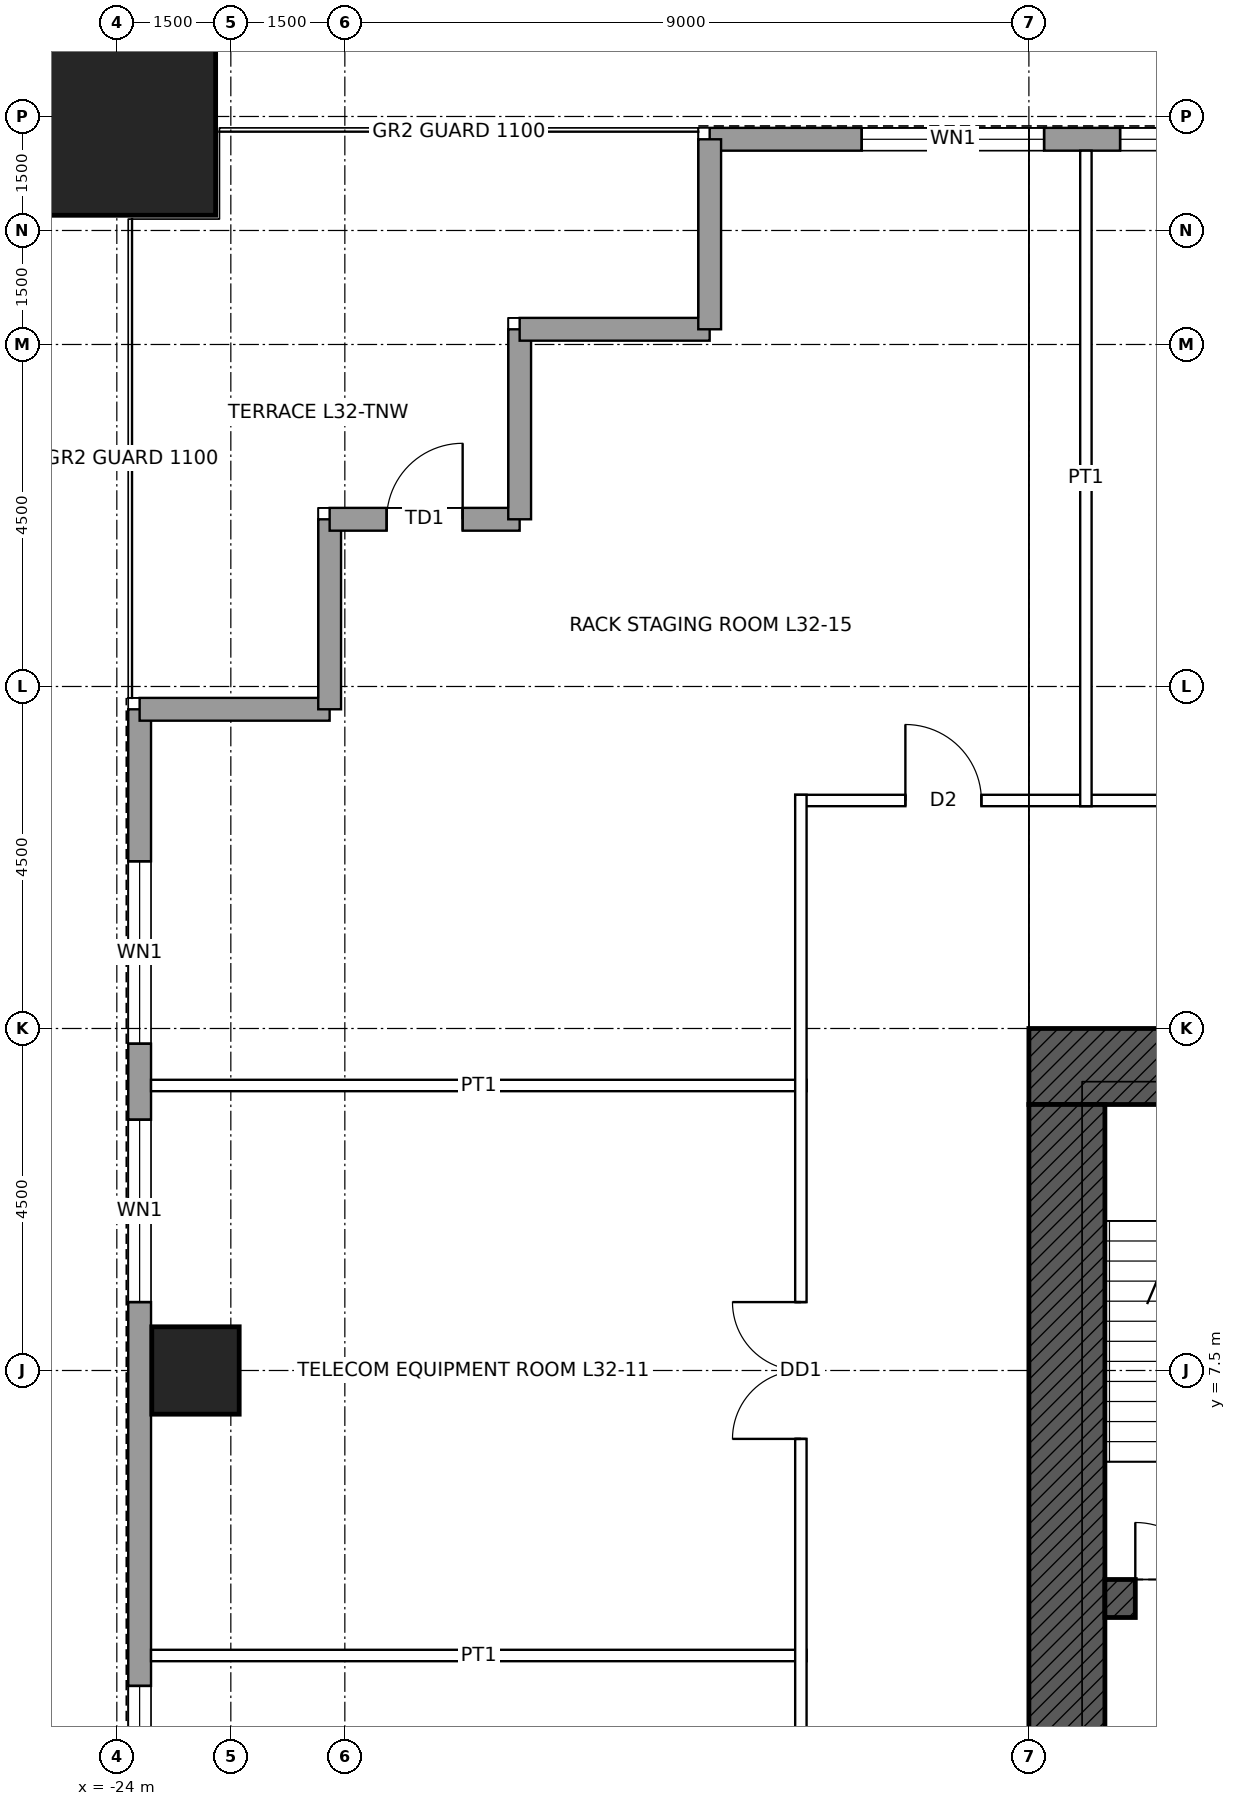
"""IFC4 building model, lengths in metres.
Left out: names, types, materials, properties, quantities, classifications, styles, units other than length and angle.
Written with IfcOpenShell. Run it as: python <this file> out.ifc"""

import sys

from ifc_helpers import new_model, si_unit, direction, frame, frame_2d, origin, origin_2d, place, context, subcontext, project, spatial, rectangle, hollow_rectangle, extrude, element, fill, save


model = new_model("IFC4")
c1 = context("Model", 3, precision=1e-05, world=origin(), true_north=direction((0.0, 1.0)))
c2 = subcontext(c1, "Body", "Model", "MODEL_VIEW")
j1 = project(units=[si_unit("LENGTHUNIT", "METRE"), si_unit("PLANEANGLEUNIT", "RADIAN")], contexts=[c1])
p1 = place(None, origin())
s1 = spatial("IfcSite", under=j1, at=p1, CompositionType="ELEMENT")
p2 = place(p1, origin())
s2 = spatial("IfcBuilding", under=s1, at=p2, CompositionType="ELEMENT")
p3 = place(p2, frame((0.0, 0.0, 158.4)))
s3 = spatial("IfcBuildingStorey", under=s2, at=p3, CompositionType="ELEMENT", Elevation=158.4)
p4 = place(p3, frame((-24.0, 24.0, 0.0), z_axis=(0.0, 0.0, 1.0), x_axis=(1.0, 0.0, 0.0)))
e1 = element("IfcColumn", 1, at=p4, inside=s3, PredefinedType="COLUMN", context=c2, shape_type="SweptSolid", body=[
    extrude(hollow_rectangle(XDim=2.6, YDim=2.6, WallThickness=0.13, at=origin_2d()), origin(), (0.0, 0.0, 1.0), 4.5),
])
p5 = place(p3, frame((-22.965, 7.5, 0.0), z_axis=(0.0, 0.0, 1.0), x_axis=(1.0, 0.0, 0.0)))
e2 = element("IfcColumn", 2, at=p5, inside=s3, PredefinedType="COLUMN", context=c2, shape_type="SweptSolid", body=[
    extrude(hollow_rectangle(XDim=1.15, YDim=1.15, WallThickness=0.075, at=origin_2d()), origin(), (0.0, 0.0, 1.0), 4.5),
])
p6 = place(p3, frame((-12.0, 11.5, 0.0), z_axis=(0.0, 0.0, 1.0), x_axis=(1.0, 0.0, 0.0)))
e3 = element("IfcWall", 3, at=p6, inside=s3, PredefinedType="SHEAR", context=c2, shape_type="SweptSolid", body=[
    extrude(rectangle(XDim=24.0, YDim=1.0, at=frame_2d((12.0, 0.0))), origin(), (0.0, 0.0, 1.0), 4.5),
])
p7 = place(p6, frame((6.25, 0.0, 0.0)))
e4 = element("IfcOpeningElement", 4, at=p7, cuts=e3, PredefinedType="OPENING", context=c2, shape_type="SweptSolid", body=[
    extrude(rectangle(XDim=1.0, YDim=2.4, at=frame_2d((0.5, 1.2))), frame((0.0, 0.51, 0.0), z_axis=(0.0, -1.0, 0.0), x_axis=(1.0, 0.0, 0.0)), (0.0, 0.0, 1.0), 1.02),
])
p8 = place(p6, frame((16.75, 0.0, 0.0)))
e5 = element("IfcOpeningElement", 5, at=p8, cuts=e3, PredefinedType="OPENING", context=c2, shape_type="SweptSolid", body=[
    extrude(rectangle(XDim=1.0, YDim=2.4, at=frame_2d((0.5, 1.2))), frame((0.0, 0.51, 0.0), z_axis=(0.0, -1.0, 0.0), x_axis=(1.0, 0.0, 0.0)), (0.0, 0.0, 1.0), 1.02),
])
p9 = place(p3, frame((-11.5, -11.0, 0.0), z_axis=(0.0, 0.0, 1.0), x_axis=(0.0, 1.0, 0.0)))
e6 = element("IfcWall", 6, at=p9, inside=s3, PredefinedType="SHEAR", context=c2, shape_type="SweptSolid", body=[
    extrude(rectangle(XDim=22.0, YDim=1.0, at=frame_2d((11.0, 0.0))), origin(), (0.0, 0.0, 1.0), 4.5),
])
p10 = place(p9, frame((10.5, 0.0, 0.0)))
e7 = element("IfcOpeningElement", 7, at=p10, cuts=e6, PredefinedType="OPENING", context=c2, shape_type="SweptSolid", body=[
    extrude(rectangle(XDim=1.0, YDim=2.4, at=frame_2d((0.5, 1.2))), frame((0.0, 0.51, 0.0), z_axis=(0.0, -1.0, 0.0), x_axis=(1.0, 0.0, 0.0)), (0.0, 0.0, 1.0), 1.02),
])
p11 = place(p3, frame((-11.0, 4.5, 0.0), z_axis=(0.0, 0.0, 1.0), x_axis=(1.0, 0.0, 0.0)))
e8 = element("IfcWall", 8, at=p11, inside=s3, PredefinedType="SHEAR", context=c2, shape_type="SweptSolid", body=[
    extrude(rectangle(XDim=22.0, YDim=0.5, at=frame_2d((11.0, 0.0))), origin(), (0.0, 0.0, 1.0), 4.5),
])
p12 = place(p11, frame((0.4, 0.0, 0.0)))
e9 = element("IfcOpeningElement", 9, at=p12, cuts=e8, PredefinedType="OPENING", context=c2, shape_type="SweptSolid", body=[
    extrude(rectangle(XDim=1.0, YDim=2.1, at=frame_2d((0.5, 1.05))), frame((0.0, 0.26, 0.0), z_axis=(0.0, -1.0, 0.0), x_axis=(1.0, 0.0, 0.0)), (0.0, 0.0, 1.0), 0.52),
])
p13 = place(p11, frame((20.6, 0.0, 0.0)))
e10 = element("IfcOpeningElement", 10, at=p13, cuts=e8, PredefinedType="OPENING", context=c2, shape_type="SweptSolid", body=[
    extrude(rectangle(XDim=1.0, YDim=2.1, at=frame_2d((0.5, 1.05))), frame((0.0, 0.26, 0.0), z_axis=(0.0, -1.0, 0.0), x_axis=(1.0, 0.0, 0.0)), (0.0, 0.0, 1.0), 0.52),
])
p14 = place(p3, frame((-16.2, 23.7, 0.0), z_axis=(0.0, 0.0, 1.0), x_axis=(1.0, 0.0, 0.0)))
e11 = element("IfcWall", 11, at=p14, inside=s3, PredefinedType="SOLIDWALL", context=c2, shape_type="SweptSolid", body=[
    extrude(rectangle(XDim=32.4, YDim=0.3, at=frame_2d((16.2, 0.0))), origin(), (0.0, 0.0, 1.0), 4.3),
])
p15 = place(p14, frame((2.0, 0.0, 1.0)))
e12 = element("IfcOpeningElement", 12, at=p15, cuts=e11, PredefinedType="OPENING", context=c2, shape_type="SweptSolid", body=[
    extrude(rectangle(XDim=2.4, YDim=1.2, at=frame_2d((1.2, 0.6))), frame((0.0, 0.16, 0.0), z_axis=(0.0, -1.0, 0.0), x_axis=(1.0, 0.0, 0.0)), (0.0, 0.0, 1.0), 0.32),
])
p16 = place(p14, frame((5.4, 0.0, 1.0)))
e13 = element("IfcOpeningElement", 13, at=p16, cuts=e11, PredefinedType="OPENING", context=c2, shape_type="SweptSolid", body=[
    extrude(rectangle(XDim=2.4, YDim=1.2, at=frame_2d((1.2, 0.6))), frame((0.0, 0.16, 0.0), z_axis=(0.0, -1.0, 0.0), x_axis=(1.0, 0.0, 0.0)), (0.0, 0.0, 1.0), 0.32),
])
p17 = place(p14, frame((10.45, 0.0, 1.0)))
e14 = element("IfcOpeningElement", 14, at=p17, cuts=e11, PredefinedType="OPENING", context=c2, shape_type="SweptSolid", body=[
    extrude(rectangle(XDim=2.4, YDim=1.2, at=frame_2d((1.2, 0.6))), frame((0.0, 0.16, 0.0), z_axis=(0.0, -1.0, 0.0), x_axis=(1.0, 0.0, 0.0)), (0.0, 0.0, 1.0), 0.32),
])
p18 = place(p14, frame((13.15, 0.0, 1.0)))
e15 = element("IfcOpeningElement", 15, at=p18, cuts=e11, PredefinedType="OPENING", context=c2, shape_type="SweptSolid", body=[
    extrude(rectangle(XDim=2.4, YDim=1.2, at=frame_2d((1.2, 0.6))), frame((0.0, 0.16, 0.0), z_axis=(0.0, -1.0, 0.0), x_axis=(1.0, 0.0, 0.0)), (0.0, 0.0, 1.0), 0.32),
])
p19 = place(p14, frame((16.85, 0.0, 1.0)))
e16 = element("IfcOpeningElement", 16, at=p19, cuts=e11, PredefinedType="OPENING", context=c2, shape_type="SweptSolid", body=[
    extrude(rectangle(XDim=2.4, YDim=1.2, at=frame_2d((1.2, 0.6))), frame((0.0, 0.16, 0.0), z_axis=(0.0, -1.0, 0.0), x_axis=(1.0, 0.0, 0.0)), (0.0, 0.0, 1.0), 0.32),
])
p20 = place(p14, frame((19.55, 0.0, 1.0)))
e17 = element("IfcOpeningElement", 17, at=p20, cuts=e11, PredefinedType="OPENING", context=c2, shape_type="SweptSolid", body=[
    extrude(rectangle(XDim=2.4, YDim=1.2, at=frame_2d((1.2, 0.6))), frame((0.0, 0.16, 0.0), z_axis=(0.0, -1.0, 0.0), x_axis=(1.0, 0.0, 0.0)), (0.0, 0.0, 1.0), 0.32),
])
p21 = place(p14, frame((24.6, 0.0, 1.0)))
e18 = element("IfcOpeningElement", 18, at=p21, cuts=e11, PredefinedType="OPENING", context=c2, shape_type="SweptSolid", body=[
    extrude(rectangle(XDim=2.4, YDim=1.2, at=frame_2d((1.2, 0.6))), frame((0.0, 0.16, 0.0), z_axis=(0.0, -1.0, 0.0), x_axis=(1.0, 0.0, 0.0)), (0.0, 0.0, 1.0), 0.32),
])
p22 = place(p14, frame((28.0, 0.0, 1.0)))
e19 = element("IfcOpeningElement", 19, at=p22, cuts=e11, PredefinedType="OPENING", context=c2, shape_type="SweptSolid", body=[
    extrude(rectangle(XDim=2.4, YDim=1.2, at=frame_2d((1.2, 0.6))), frame((0.0, 0.16, 0.0), z_axis=(0.0, -1.0, 0.0), x_axis=(1.0, 0.0, 0.0)), (0.0, 0.0, 1.0), 0.32),
])
p23 = place(p3, frame((-23.7, -16.2, 0.0), z_axis=(0.0, 0.0, 1.0), x_axis=(0.0, 1.0, 0.0)))
e20 = element("IfcWall", 20, at=p23, inside=s3, PredefinedType="SOLIDWALL", context=c2, shape_type="SweptSolid", body=[
    extrude(rectangle(XDim=32.4, YDim=0.3, at=frame_2d((16.2, 0.0))), origin(), (0.0, 0.0, 1.0), 4.3),
])
p24 = place(p23, frame((0.65, 0.0, 1.0)))
e21 = element("IfcOpeningElement", 21, at=p24, cuts=e20, PredefinedType="OPENING", context=c2, shape_type="SweptSolid", body=[
    extrude(rectangle(XDim=1.8, YDim=1.2, at=frame_2d((0.9, 0.6))), frame((0.0, 0.16, 0.0), z_axis=(0.0, -1.0, 0.0), x_axis=(1.0, 0.0, 0.0)), (0.0, 0.0, 1.0), 0.32),
])
p25 = place(p23, frame((2.75, 0.0, 1.0)))
e22 = element("IfcOpeningElement", 22, at=p25, cuts=e20, PredefinedType="OPENING", context=c2, shape_type="SweptSolid", body=[
    extrude(rectangle(XDim=1.8, YDim=1.2, at=frame_2d((0.9, 0.6))), frame((0.0, 0.16, 0.0), z_axis=(0.0, -1.0, 0.0), x_axis=(1.0, 0.0, 0.0)), (0.0, 0.0, 1.0), 0.32),
])
p26 = place(p23, frame((5.4, 0.0, 1.0)))
e23 = element("IfcOpeningElement", 23, at=p26, cuts=e20, PredefinedType="OPENING", context=c2, shape_type="SweptSolid", body=[
    extrude(rectangle(XDim=2.4, YDim=1.2, at=frame_2d((1.2, 0.6))), frame((0.0, 0.16, 0.0), z_axis=(0.0, -1.0, 0.0), x_axis=(1.0, 0.0, 0.0)), (0.0, 0.0, 1.0), 0.32),
])
p27 = place(p23, frame((12.95, 0.0, 1.0)))
e24 = element("IfcOpeningElement", 24, at=p27, cuts=e20, PredefinedType="OPENING", context=c2, shape_type="SweptSolid", body=[
    extrude(rectangle(XDim=2.4, YDim=1.2, at=frame_2d((1.2, 0.6))), frame((0.0, 0.16, 0.0), z_axis=(0.0, -1.0, 0.0), x_axis=(1.0, 0.0, 0.0)), (0.0, 0.0, 1.0), 0.32),
])
p28 = place(p23, frame((15.65, 0.0, 1.0)))
e25 = element("IfcOpeningElement", 25, at=p28, cuts=e20, PredefinedType="OPENING", context=c2, shape_type="SweptSolid", body=[
    extrude(rectangle(XDim=1.8, YDim=1.2, at=frame_2d((0.9, 0.6))), frame((0.0, 0.16, 0.0), z_axis=(0.0, -1.0, 0.0), x_axis=(1.0, 0.0, 0.0)), (0.0, 0.0, 1.0), 0.32),
])
p29 = place(p23, frame((17.75, 0.0, 1.0)))
e26 = element("IfcOpeningElement", 26, at=p29, cuts=e20, PredefinedType="OPENING", context=c2, shape_type="SweptSolid", body=[
    extrude(rectangle(XDim=1.8, YDim=1.2, at=frame_2d((0.9, 0.6))), frame((0.0, 0.16, 0.0), z_axis=(0.0, -1.0, 0.0), x_axis=(1.0, 0.0, 0.0)), (0.0, 0.0, 1.0), 0.32),
])
p30 = place(p23, frame((24.6, 0.0, 1.0)))
e27 = element("IfcOpeningElement", 27, at=p30, cuts=e20, PredefinedType="OPENING", context=c2, shape_type="SweptSolid", body=[
    extrude(rectangle(XDim=2.4, YDim=1.2, at=frame_2d((1.2, 0.6))), frame((0.0, 0.16, 0.0), z_axis=(0.0, -1.0, 0.0), x_axis=(1.0, 0.0, 0.0)), (0.0, 0.0, 1.0), 0.32),
])
p31 = place(p23, frame((28.0, 0.0, 1.0)))
e28 = element("IfcOpeningElement", 28, at=p31, cuts=e20, PredefinedType="OPENING", context=c2, shape_type="SweptSolid", body=[
    extrude(rectangle(XDim=2.4, YDim=1.2, at=frame_2d((1.2, 0.6))), frame((0.0, 0.16, 0.0), z_axis=(0.0, -1.0, 0.0), x_axis=(1.0, 0.0, 0.0)), (0.0, 0.0, 1.0), 0.32),
])
for number, where, z_axis, x_axis in (
    (29, (-23.7, 16.2, 0.0), (0.0, 0.0, 1.0), (1.0, 0.0, 0.0)),
    (30, (-21.2, 16.2, 0.0), (0.0, 0.0, 1.0), (0.0, 1.0, 0.0)),
):
    element("IfcWall", number, at=place(p3, frame(where, z_axis=z_axis, x_axis=x_axis)), inside=s3, PredefinedType="SOLIDWALL", context=c2, shape_type="SweptSolid", body=[
        extrude(rectangle(XDim=2.5, YDim=0.3, at=frame_2d((1.25, 0.0))), origin(), (0.0, 0.0, 1.0), 4.3),
    ])
p32 = place(p3, frame((-21.2, 18.7, 0.0), z_axis=(0.0, 0.0, 1.0), x_axis=(1.0, 0.0, 0.0)))
e31 = element("IfcWall", 31, at=p32, inside=s3, PredefinedType="SOLIDWALL", context=c2, shape_type="SweptSolid", body=[
    extrude(rectangle(XDim=2.5, YDim=0.3, at=frame_2d((1.25, 0.0))), origin(), (0.0, 0.0, 1.0), 4.3),
])
p33 = place(p32, frame((0.75, 0.0, 0.0)))
e32 = element("IfcOpeningElement", 32, at=p33, cuts=e31, PredefinedType="OPENING", context=c2, shape_type="SweptSolid", body=[
    extrude(rectangle(XDim=1.0, YDim=2.4, at=frame_2d((0.5, 1.2))), frame((0.0, 0.16, 0.0), z_axis=(0.0, -1.0, 0.0), x_axis=(1.0, 0.0, 0.0)), (0.0, 0.0, 1.0), 0.32),
])
for number, where, z_axis, x_axis in (
    (33, (-18.7, 18.7, 0.0), (0.0, 0.0, 1.0), (0.0, 1.0, 0.0)),
    (34, (-18.7, 21.2, 0.0), (0.0, 0.0, 1.0), (1.0, 0.0, 0.0)),
    (35, (-16.2, 21.2, 0.0), (0.0, 0.0, 1.0), (0.0, 1.0, 0.0)),
):
    element("IfcWall", number, at=place(p3, frame(where, z_axis=z_axis, x_axis=x_axis)), inside=s3, PredefinedType="SOLIDWALL", context=c2, shape_type="SweptSolid", body=[
        extrude(rectangle(XDim=2.5, YDim=0.3, at=frame_2d((1.25, 0.0))), origin(), (0.0, 0.0, 1.0), 4.3),
    ])
for number, where, z_axis, x_axis in (
    (36, (-23.55, 3.75, 0.0), (0.0, 0.0, 1.0), (1.0, 0.0, 0.0)),
    (37, (-23.55, 11.25, 0.0), (0.0, 0.0, 1.0), (1.0, 0.0, 0.0)),
):
    element("IfcWall", number, at=place(p3, frame(where, z_axis=z_axis, x_axis=x_axis)), inside=s3, PredefinedType="PARTITIONING", context=c2, shape_type="SweptSolid", body=[
        extrude(rectangle(XDim=8.625, YDim=0.15, at=frame_2d((4.312, 0.0))), origin(), (0.0, 0.0, 1.0), 3.431),
    ])
p34 = place(p3, frame((-15.075, 15.0, 0.0), z_axis=(0.0, 0.0, 1.0), x_axis=(1.0, 0.0, 0.0)))
e38 = element("IfcWall", 38, at=p34, inside=s3, PredefinedType="PARTITIONING", context=c2, shape_type="SweptSolid", body=[
    extrude(rectangle(XDim=30.15, YDim=0.15, at=frame_2d((15.075, 0.0))), origin(), (0.0, 0.0, 1.0), 4.3),
])
p35 = place(p34, frame((8.55, 0.0, 0.0)))
e39 = element("IfcOpeningElement", 39, at=p35, cuts=e38, PredefinedType="OPENING", context=c2, shape_type="SweptSolid", body=[
    extrude(rectangle(XDim=1.8, YDim=2.4, at=frame_2d((0.9, 1.2))), frame((0.0, 0.085, 0.0), z_axis=(0.0, -1.0, 0.0), x_axis=(1.0, 0.0, 0.0)), (0.0, 0.0, 1.0), 0.17),
])
p36 = place(p34, frame((19.8, 0.0, 0.0)))
e40 = element("IfcOpeningElement", 40, at=p36, cuts=e38, PredefinedType="OPENING", context=c2, shape_type="SweptSolid", body=[
    extrude(rectangle(XDim=1.8, YDim=2.4, at=frame_2d((0.9, 1.2))), frame((0.0, 0.085, 0.0), z_axis=(0.0, -1.0, 0.0), x_axis=(1.0, 0.0, 0.0)), (0.0, 0.0, 1.0), 0.17),
])
p37 = place(p34, frame((27.7, 0.0, 0.0)))
e41 = element("IfcOpeningElement", 41, at=p37, cuts=e38, PredefinedType="OPENING", context=c2, shape_type="SweptSolid", body=[
    extrude(rectangle(XDim=1.0, YDim=2.1, at=frame_2d((0.5, 1.05))), frame((0.0, 0.085, 0.0), z_axis=(0.0, -1.0, 0.0), x_axis=(1.0, 0.0, 0.0)), (0.0, 0.0, 1.0), 0.17),
])
p38 = place(p34, frame((1.45, 0.0, 0.0)))
e42 = element("IfcOpeningElement", 42, at=p38, cuts=e38, PredefinedType="OPENING", context=c2, shape_type="SweptSolid", body=[
    extrude(rectangle(XDim=1.0, YDim=2.1, at=frame_2d((0.5, 1.05))), frame((0.0, 0.085, 0.0), z_axis=(0.0, -1.0, 0.0), x_axis=(1.0, 0.0, 0.0)), (0.0, 0.0, 1.0), 0.17),
])
p39 = place(p3, frame((-15.0, -15.075, 0.0), z_axis=(0.0, 0.0, 1.0), x_axis=(0.0, 1.0, 0.0)))
e43 = element("IfcWall", 43, at=p39, inside=s3, PredefinedType="PARTITIONING", context=c2, shape_type="SweptSolid", body=[
    extrude(rectangle(XDim=30.15, YDim=0.15, at=frame_2d((15.075, 0.0))), origin(), (0.0, 0.0, 1.0), 4.3),
])
p40 = place(p39, frame((7.075, 0.0, 0.0)))
e44 = element("IfcOpeningElement", 44, at=p40, cuts=e43, PredefinedType="OPENING", context=c2, shape_type="SweptSolid", body=[
    extrude(rectangle(XDim=1.0, YDim=2.1, at=frame_2d((0.5, 1.05))), frame((0.0, 0.085, 0.0), z_axis=(0.0, -1.0, 0.0), x_axis=(1.0, 0.0, 0.0)), (0.0, 0.0, 1.0), 0.17),
])
p41 = place(p39, frame((14.575, 0.0, 0.0)))
e45 = element("IfcOpeningElement", 45, at=p41, cuts=e43, PredefinedType="OPENING", context=c2, shape_type="SweptSolid", body=[
    extrude(rectangle(XDim=1.0, YDim=2.1, at=frame_2d((0.5, 1.05))), frame((0.0, 0.085, 0.0), z_axis=(0.0, -1.0, 0.0), x_axis=(1.0, 0.0, 0.0)), (0.0, 0.0, 1.0), 0.17),
])
p42 = place(p39, frame((21.675, 0.0, 0.0)))
e46 = element("IfcOpeningElement", 46, at=p42, cuts=e43, PredefinedType="OPENING", context=c2, shape_type="SweptSolid", body=[
    extrude(rectangle(XDim=1.8, YDim=2.4, at=frame_2d((0.9, 1.2))), frame((0.0, 0.085, 0.0), z_axis=(0.0, -1.0, 0.0), x_axis=(1.0, 0.0, 0.0)), (0.0, 0.0, 1.0), 0.17),
])
p43 = place(p3, frame((-11.25, 14.925, 0.0), z_axis=(0.0, 0.0, 1.0), x_axis=(0.0, 1.0, 0.0)))
e47 = element("IfcWall", 47, at=p43, inside=s3, PredefinedType="PARTITIONING", context=c2, shape_type="SweptSolid", body=[
    extrude(rectangle(XDim=8.625, YDim=0.15, at=frame_2d((4.312, 0.0))), origin(), (0.0, 0.0, 1.0), 3.431),
])
p44 = place(p15, origin())
e48 = element("IfcWindow", 48, at=p44, inside=s3, PartitioningType="SINGLE_PANEL", PredefinedType="WINDOW", context=c2, shape_type="SweptSolid", body=[
    extrude(rectangle(XDim=2.4, YDim=1.2, at=frame_2d((1.2, 0.6))), frame((0.0, 0.03, 0.0), z_axis=(0.0, -1.0, 0.0), x_axis=(1.0, 0.0, 0.0)), (0.0, 0.0, 1.0), 0.06),
])
fill(e12, e48)
p45 = place(p16, origin())
e49 = element("IfcWindow", 49, at=p45, inside=s3, PartitioningType="SINGLE_PANEL", PredefinedType="WINDOW", context=c2, shape_type="SweptSolid", body=[
    extrude(rectangle(XDim=2.4, YDim=1.2, at=frame_2d((1.2, 0.6))), frame((0.0, 0.03, 0.0), z_axis=(0.0, -1.0, 0.0), x_axis=(1.0, 0.0, 0.0)), (0.0, 0.0, 1.0), 0.06),
])
fill(e13, e49)
p46 = place(p29, origin())
e50 = element("IfcWindow", 50, at=p46, inside=s3, PartitioningType="SINGLE_PANEL", PredefinedType="WINDOW", context=c2, shape_type="SweptSolid", body=[
    extrude(rectangle(XDim=1.8, YDim=1.2, at=frame_2d((0.9, 0.6))), frame((0.0, 0.03, 0.0), z_axis=(0.0, -1.0, 0.0), x_axis=(1.0, 0.0, 0.0)), (0.0, 0.0, 1.0), 0.06),
])
fill(e26, e50)
p47 = place(p30, origin())
e51 = element("IfcWindow", 51, at=p47, inside=s3, PartitioningType="SINGLE_PANEL", PredefinedType="WINDOW", context=c2, shape_type="SweptSolid", body=[
    extrude(rectangle(XDim=2.4, YDim=1.2, at=frame_2d((1.2, 0.6))), frame((0.0, 0.03, 0.0), z_axis=(0.0, -1.0, 0.0), x_axis=(1.0, 0.0, 0.0)), (0.0, 0.0, 1.0), 0.06),
])
fill(e27, e51)
p48 = place(p31, origin())
e52 = element("IfcWindow", 52, at=p48, inside=s3, PartitioningType="SINGLE_PANEL", PredefinedType="WINDOW", context=c2, shape_type="SweptSolid", body=[
    extrude(rectangle(XDim=2.4, YDim=1.2, at=frame_2d((1.2, 0.6))), frame((0.0, 0.03, 0.0), z_axis=(0.0, -1.0, 0.0), x_axis=(1.0, 0.0, 0.0)), (0.0, 0.0, 1.0), 0.06),
])
fill(e28, e52)
p49 = place(p33, origin())
e53 = element("IfcDoor", 53, at=p49, inside=s3, OperationType="SINGLE_SWING_RIGHT", PredefinedType="DOOR", context=c2, shape_type="SweptSolid", body=[
    extrude(rectangle(XDim=1.0, YDim=2.4, at=frame_2d((0.5, 1.2))), frame((0.0, 0.025, 0.0), z_axis=(0.0, -1.0, 0.0), x_axis=(1.0, 0.0, 0.0)), (0.0, 0.0, 1.0), 0.05),
])
fill(e32, e53)
p50 = place(p12, origin())
e54 = element("IfcDoor", 54, at=p50, inside=s3, OperationType="SINGLE_SWING_LEFT", PredefinedType="DOOR", context=c2, shape_type="SweptSolid", body=[
    extrude(rectangle(XDim=1.0, YDim=2.1, at=frame_2d((0.5, 1.05))), frame((0.0, 0.025, 0.0), z_axis=(0.0, -1.0, 0.0), x_axis=(1.0, 0.0, 0.0)), (0.0, 0.0, 1.0), 0.05),
])
fill(e9, e54)
p51 = place(p42, origin())
e55 = element("IfcDoor", 55, at=p51, inside=s3, OperationType="DOUBLE_DOOR_SINGLE_SWING", PredefinedType="DOOR", context=c2, shape_type="SweptSolid", body=[
    extrude(rectangle(XDim=1.8, YDim=2.4, at=frame_2d((0.9, 1.2))), frame((0.0, 0.025, 0.0), z_axis=(0.0, -1.0, 0.0), x_axis=(1.0, 0.0, 0.0)), (0.0, 0.0, 1.0), 0.05),
])
fill(e46, e55)
p52 = place(p38, origin())
e56 = element("IfcDoor", 56, at=p52, inside=s3, OperationType="SINGLE_SWING_LEFT", PredefinedType="DOOR", context=c2, shape_type="SweptSolid", body=[
    extrude(rectangle(XDim=1.0, YDim=2.1, at=frame_2d((0.5, 1.05))), frame((0.0, 0.025, 0.0), z_axis=(0.0, -1.0, 0.0), x_axis=(1.0, 0.0, 0.0)), (0.0, 0.0, 1.0), 0.05),
])
fill(e42, e56)
save(model, sys.argv[1])
